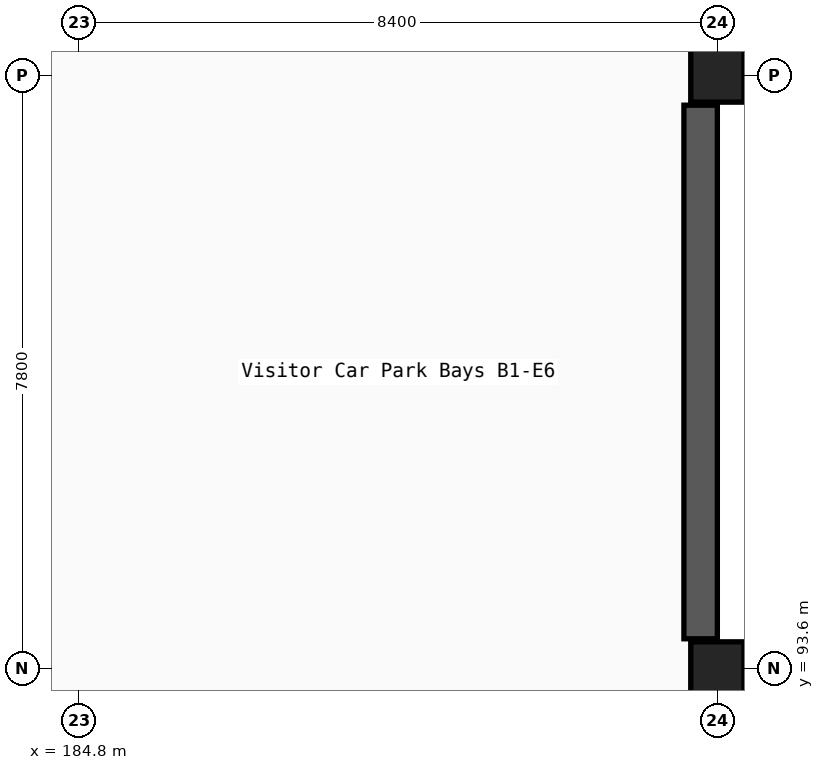
"""IFC4 building model, lengths in metres.
Left out: names, types, materials, properties, quantities, classifications, styles, units other than length and angle.
Written with IfcOpenShell. Run it as: python <this file> out.ifc"""

import sys

from ifc_helpers import new_model, si_unit, direction, frame, frame_2d, origin, origin_2d, place, context, subcontext, project, spatial, rectangle, i_section, extrude, element, save


model = new_model("IFC4")
c1 = context("Model", 3, precision=1e-05, world=origin(), true_north=direction((0.0, 1.0)))
c2 = subcontext(c1, "Body", "Model", "MODEL_VIEW")
j1 = project(units=[si_unit("LENGTHUNIT", "METRE"), si_unit("PLANEANGLEUNIT", "RADIAN")], contexts=[c1])
p1 = place(None, origin())
s1 = spatial("IfcSite", under=j1, at=p1, CompositionType="ELEMENT")
p2 = place(p1, origin())
s2 = spatial("IfcBuilding", under=s1, at=p2, CompositionType="ELEMENT")
p3 = place(p2, frame((0.0, 0.0, -5.1)))
s3 = spatial("IfcBuildingStorey", under=s2, at=p3, CompositionType="ELEMENT", Elevation=-5.1)
for number, where, z_axis, x_axis in (
    (1, (193.2, 93.6, -0.22), (0.0, 0.0, 1.0), (1.0, 0.0, 0.0)),
    (2, (193.2, 101.4, -0.22), (0.0, 0.0, 1.0), (1.0, 0.0, 0.0)),
):
    element("IfcColumn", number, at=place(p3, frame(where, z_axis=z_axis, x_axis=x_axis)), inside=s3, PredefinedType="COLUMN", context=c2, shape_type="SweptSolid", body=[
        extrude(i_section(OverallWidth=0.3, OverallDepth=0.7, WebThickness=0.017, FlangeThickness=0.032, FilletRadius=0.027, at=origin_2d()), origin(), (0.0, 0.0, 1.0), 5.32),
    ])
p4 = place(p3, frame((192.98, 93.99, 0.0), z_axis=(0.0, 0.0, 1.0), x_axis=(0.0, 1.0, 0.0)))
e3 = element("IfcWall", 3, at=p4, inside=s3, PredefinedType="USERDEFINED", context=c2, shape_type="SweptSolid", body=[
    extrude(rectangle(XDim=7.02, YDim=0.44, at=frame_2d((3.51, 0.0))), origin(), (0.0, 0.0, 1.0), 4.33),
])
save(model, sys.argv[1])
